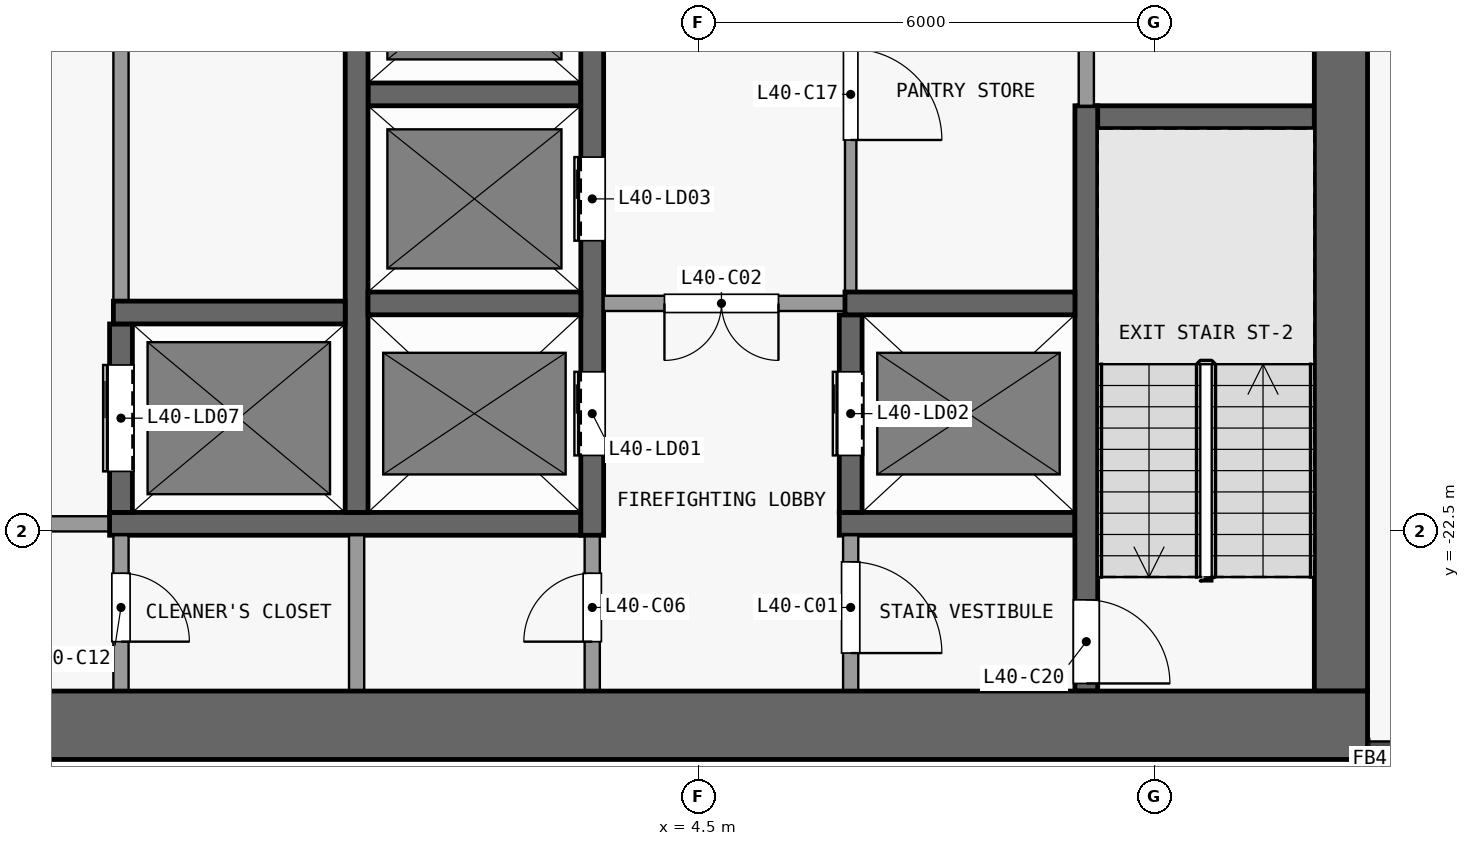
"""IFC4 building model, lengths in metres.
Left out: names, types, materials, properties, quantities, classifications, styles, units other than length and angle.
Written with IfcOpenShell. Run it as: python <this file> out.ifc"""

import sys

from ifc_helpers import new_model, si_unit, direction, frame, frame_2d, origin, place, context, subcontext, project, spatial, rectangle, extrude, element, fill, save


model = new_model("IFC4")
c1 = context("Model", 3, precision=1e-05, world=origin(), true_north=direction((0.0, 1.0)))
c2 = subcontext(c1, "Body", "Model", "MODEL_VIEW")
j1 = project(units=[si_unit("LENGTHUNIT", "METRE"), si_unit("PLANEANGLEUNIT", "RADIAN")], contexts=[c1])
p1 = place(None, origin())
s1 = spatial("IfcSite", under=j1, at=p1, CompositionType="ELEMENT")
p2 = place(p1, origin())
s2 = spatial("IfcBuilding", under=s1, at=p2, CompositionType="ELEMENT")
p3 = place(p2, frame((0.0, 0.0, 163.7)))
s3 = spatial("IfcBuildingStorey", under=s2, at=p3, CompositionType="ELEMENT", Elevation=163.7)
p4 = place(p3, frame((-13.3, -25.05, 0.0), z_axis=(0.0, 0.0, 1.0), x_axis=(1.0, 0.0, 0.0)))
e1 = element("IfcWall", 1, at=p4, inside=s3, PredefinedType="SHEAR", context=c2, shape_type="SweptSolid", body=[
    extrude(rectangle(XDim=26.6, YDim=0.9, at=frame_2d((13.3, 0.0))), origin(), (0.0, 0.0, 1.0), 3.3),
])
p5 = place(p3, frame((12.95, -24.6, 0.0), z_axis=(0.0, 0.0, 1.0), x_axis=(0.0, 1.0, 0.0)))
e2 = element("IfcWall", 2, at=p5, inside=s3, PredefinedType="SHEAR", context=c2, shape_type="SweptSolid", body=[
    extrude(rectangle(XDim=16.1, YDim=0.7, at=frame_2d((8.05, 0.0))), origin(), (0.0, 0.0, 1.0), 3.3),
])
p6 = place(p3, frame((-3.25, -22.4, 0.0), z_axis=(0.0, 0.0, 1.0), x_axis=(-1.0, 0.0, 0.0)))
e3 = element("IfcWall", 3, at=p6, inside=s3, PredefinedType="PARTITIONING", context=c2, shape_type="SweptSolid", body=[
    extrude(rectangle(XDim=6.2, YDim=0.2, at=frame_2d((3.1, 0.0))), origin(), (0.0, 0.0, 1.0), 3.3),
])
p7 = place(p6, frame((0.8, 0.0, 0.0)))
e4 = element("IfcOpeningElement", 4, at=p7, cuts=e3, PredefinedType="OPENING", context=c2, shape_type="SweptSolid", body=[
    extrude(rectangle(XDim=1.5, YDim=2.1, at=frame_2d((0.75, 1.05))), frame((0.0, 0.11, 0.0), z_axis=(0.0, -1.0, 0.0), x_axis=(1.0, 0.0, 0.0)), (0.0, 0.0, 1.0), 0.22),
])
p8 = place(p3, frame((-3.25, -22.4, 0.0), z_axis=(0.0, 0.0, 1.0), x_axis=(1.0, 0.0, 0.0)))
e5 = element("IfcWall", 5, at=p8, inside=s3, PredefinedType="SHEAR", context=c2, shape_type="SweptSolid", body=[
    extrude(rectangle(XDim=6.2, YDim=0.3, at=frame_2d((3.1, 0.0))), origin(), (0.0, 0.0, 1.0), 3.3),
])
p9 = place(p3, frame((6.35, -22.4, 0.0), z_axis=(0.0, 0.0, 1.0), x_axis=(1.0, 0.0, 0.0)))
e6 = element("IfcWall", 6, at=p9, inside=s3, PredefinedType="SHEAR", context=c2, shape_type="SweptSolid", body=[
    extrude(rectangle(XDim=3.1, YDim=0.3, at=frame_2d((1.55, 0.0))), origin(), (0.0, 0.0, 1.0), 3.3),
])
p10 = place(p3, frame((-3.2, -19.62, 0.0), z_axis=(0.0, 0.0, 1.0), x_axis=(1.0, 0.0, 0.0)))
e7 = element("IfcWall", 7, at=p10, inside=s3, PredefinedType="SHEAR", context=c2, shape_type="SweptSolid", body=[
    extrude(rectangle(XDim=3.05, YDim=0.3, at=frame_2d((1.525, 0.0))), origin(), (0.0, 0.0, 1.0), 3.3),
])
p11 = place(p3, frame((0.15, -19.5, 0.0), z_axis=(0.0, 0.0, 1.0), x_axis=(1.0, 0.0, 0.0)))
e8 = element("IfcWall", 8, at=p11, inside=s3, PredefinedType="SHEAR", context=c2, shape_type="SweptSolid", body=[
    extrude(rectangle(XDim=2.8, YDim=0.3, at=frame_2d((1.4, 0.0))), origin(), (0.0, 0.0, 1.0), 3.3),
])
p12 = place(p3, frame((6.575, -19.5, 0.0), z_axis=(0.0, 0.0, 1.0), x_axis=(-1.0, 0.0, 0.0)))
e9 = element("IfcWall", 9, at=p12, inside=s3, PredefinedType="PARTITIONING", context=c2, shape_type="SweptSolid", body=[
    extrude(rectangle(XDim=3.325, YDim=0.2, at=frame_2d((1.663, 0.0))), origin(), (0.0, 0.0, 1.0), 3.3),
])
p13 = place(p12, frame((1.025, 0.0, 0.0)))
e10 = element("IfcOpeningElement", 10, at=p13, cuts=e9, PredefinedType="OPENING", context=c2, shape_type="SweptSolid", body=[
    extrude(rectangle(XDim=1.5, YDim=2.1, at=frame_2d((0.75, 1.05))), frame((0.0, 0.11, 0.0), z_axis=(0.0, -1.0, 0.0), x_axis=(1.0, 0.0, 0.0)), (0.0, 0.0, 1.0), 0.22),
])
p14 = place(p3, frame((6.425, -19.5, 0.0), z_axis=(0.0, 0.0, 1.0), x_axis=(1.0, 0.0, 0.0)))
e11 = element("IfcWall", 11, at=p14, inside=s3, PredefinedType="SHEAR", context=c2, shape_type="SweptSolid", body=[
    extrude(rectangle(XDim=3.025, YDim=0.3, at=frame_2d((1.512, 0.0))), origin(), (0.0, 0.0, 1.0), 3.3),
])
p15 = place(p3, frame((9.5, -17.05, 0.0), z_axis=(0.0, 0.0, 1.0), x_axis=(1.0, 0.0, 0.0)))
e12 = element("IfcWall", 12, at=p15, inside=s3, PredefinedType="SHEAR", context=c2, shape_type="SweptSolid", body=[
    extrude(rectangle(XDim=3.1, YDim=0.3, at=frame_2d((1.55, 0.0))), origin(), (0.0, 0.0, 1.0), 3.3),
])
p16 = place(p3, frame((0.15, -16.75, 0.0), z_axis=(0.0, 0.0, 1.0), x_axis=(1.0, 0.0, 0.0)))
e13 = element("IfcWall", 13, at=p16, inside=s3, PredefinedType="SHEAR", context=c2, shape_type="SweptSolid", body=[
    extrude(rectangle(XDim=2.8, YDim=0.3, at=frame_2d((1.4, 0.0))), origin(), (0.0, 0.0, 1.0), 3.3),
])
p17 = place(p3, frame((-3.1, -22.55, 0.0), z_axis=(0.0, 0.0, 1.0), x_axis=(0.0, -1.0, 0.0)))
e14 = element("IfcWall", 14, at=p17, inside=s3, PredefinedType="PARTITIONING", context=c2, shape_type="SweptSolid", body=[
    extrude(rectangle(XDim=2.05, YDim=0.2, at=frame_2d((1.025, 0.0))), origin(), (0.0, 0.0, 1.0), 3.3),
])
p18 = place(p17, frame((0.5, 0.0, 0.0)))
e15 = element("IfcOpeningElement", 15, at=p18, cuts=e14, PredefinedType="OPENING", context=c2, shape_type="SweptSolid", body=[
    extrude(rectangle(XDim=0.9, YDim=2.1, at=frame_2d((0.45, 1.05))), frame((0.0, 0.11, 0.0), z_axis=(0.0, -1.0, 0.0), x_axis=(1.0, 0.0, 0.0)), (0.0, 0.0, 1.0), 0.22),
])
p19 = place(p3, frame((-3.1, -22.25, 0.0), z_axis=(0.0, 0.0, 1.0), x_axis=(0.0, 1.0, 0.0)))
e16 = element("IfcWall", 16, at=p19, inside=s3, PredefinedType="SHEAR", context=c2, shape_type="SweptSolid", body=[
    extrude(rectangle(XDim=2.48, YDim=0.3, at=frame_2d((1.24, 0.0))), origin(), (0.0, 0.0, 1.0), 3.3),
])
p20 = place(p19, frame((0.54, 0.0, 0.0)))
e17 = element("IfcOpeningElement", 17, at=p20, cuts=e16, PredefinedType="OPENING", context=c2, shape_type="SweptSolid", body=[
    extrude(rectangle(XDim=1.4, YDim=2.1, at=frame_2d((0.7, 1.05))), frame((0.0, 0.16, 0.0), z_axis=(0.0, -1.0, 0.0), x_axis=(1.0, 0.0, 0.0)), (0.0, 0.0, 1.0), 0.32),
])
p21 = place(p3, frame((-3.1, -8.5, 0.0), z_axis=(0.0, 0.0, 1.0), x_axis=(0.0, -1.0, 0.0)))
e18 = element("IfcWall", 18, at=p21, inside=s3, PredefinedType="PARTITIONING", context=c2, shape_type="SweptSolid", body=[
    extrude(rectangle(XDim=10.97, YDim=0.2, at=frame_2d((5.485, 0.0))), origin(), (0.0, 0.0, 1.0), 3.3),
])
p22 = place(p21, frame((6.35, 0.0, 0.0)))
e19 = element("IfcOpeningElement", 19, at=p22, cuts=e18, PredefinedType="OPENING", context=c2, shape_type="SweptSolid", body=[
    extrude(rectangle(XDim=1.2, YDim=2.1, at=frame_2d((0.6, 1.05))), frame((0.0, 0.11, 0.0), z_axis=(0.0, -1.0, 0.0), x_axis=(1.0, 0.0, 0.0)), (0.0, 0.0, 1.0), 0.22),
])
p23 = place(p21, frame((0.94, 0.0, 0.0)))
e20 = element("IfcOpeningElement", 20, at=p23, cuts=e18, PredefinedType="OPENING", context=c2, shape_type="SweptSolid", body=[
    extrude(rectangle(XDim=0.9, YDim=2.1, at=frame_2d((0.45, 1.05))), frame((0.0, 0.11, 0.0), z_axis=(0.0, -1.0, 0.0), x_axis=(1.0, 0.0, 0.0)), (0.0, 0.0, 1.0), 0.22),
])
p24 = place(p3, frame((0.0, -24.6, 0.0), z_axis=(0.0, 0.0, 1.0), x_axis=(0.0, 1.0, 0.0)))
e21 = element("IfcWall", 21, at=p24, inside=s3, PredefinedType="PARTITIONING", context=c2, shape_type="SweptSolid", body=[
    extrude(rectangle(XDim=2.05, YDim=0.2, at=frame_2d((1.025, 0.0))), origin(), (0.0, 0.0, 1.0), 3.3),
])
p25 = place(p3, frame((0.0, -22.25, 0.0), z_axis=(0.0, 0.0, 1.0), x_axis=(0.0, 1.0, 0.0)))
e22 = element("IfcWall", 22, at=p25, inside=s3, PredefinedType="SHEAR", context=c2, shape_type="SweptSolid", body=[
    extrude(rectangle(XDim=13.75, YDim=0.3, at=frame_2d((6.875, 0.0))), origin(), (0.0, 0.0, 1.0), 3.3),
])
p26 = place(p3, frame((3.1, -24.6, 0.0), z_axis=(0.0, 0.0, 1.0), x_axis=(0.0, 1.0, 0.0)))
e23 = element("IfcWall", 23, at=p26, inside=s3, PredefinedType="PARTITIONING", context=c2, shape_type="SweptSolid", body=[
    extrude(rectangle(XDim=2.05, YDim=0.2, at=frame_2d((1.025, 0.0))), origin(), (0.0, 0.0, 1.0), 3.3),
])
p27 = place(p26, frame((0.65, 0.0, 0.0)))
e24 = element("IfcOpeningElement", 24, at=p27, cuts=e23, PredefinedType="OPENING", context=c2, shape_type="SweptSolid", body=[
    extrude(rectangle(XDim=0.9, YDim=2.1, at=frame_2d((0.45, 1.05))), frame((0.0, 0.11, 0.0), z_axis=(0.0, -1.0, 0.0), x_axis=(1.0, 0.0, 0.0)), (0.0, 0.0, 1.0), 0.22),
])
p28 = place(p3, frame((3.1, -22.55, 0.0), z_axis=(0.0, 0.0, 1.0), x_axis=(0.0, 1.0, 0.0)))
e25 = element("IfcWall", 25, at=p28, inside=s3, PredefinedType="SHEAR", context=c2, shape_type="SweptSolid", body=[
    extrude(rectangle(XDim=14.05, YDim=0.3, at=frame_2d((7.025, 0.0))), origin(), (0.0, 0.0, 1.0), 3.3),
])
p29 = place(p28, frame((1.05, 0.0, 0.0)))
e26 = element("IfcOpeningElement", 26, at=p29, cuts=e25, PredefinedType="OPENING", context=c2, shape_type="SweptSolid", body=[
    extrude(rectangle(XDim=1.1, YDim=2.1, at=frame_2d((0.55, 1.05))), frame((0.0, 0.16, 0.0), z_axis=(0.0, -1.0, 0.0), x_axis=(1.0, 0.0, 0.0)), (0.0, 0.0, 1.0), 0.32),
])
p30 = place(p28, frame((3.875, 0.0, 0.0)))
e27 = element("IfcOpeningElement", 27, at=p30, cuts=e25, PredefinedType="OPENING", context=c2, shape_type="SweptSolid", body=[
    extrude(rectangle(XDim=1.1, YDim=2.1, at=frame_2d((0.55, 1.05))), frame((0.0, 0.16, 0.0), z_axis=(0.0, -1.0, 0.0), x_axis=(1.0, 0.0, 0.0)), (0.0, 0.0, 1.0), 0.32),
])
p31 = place(p28, frame((6.625, 0.0, 0.0)))
e28 = element("IfcOpeningElement", 28, at=p31, cuts=e25, PredefinedType="OPENING", context=c2, shape_type="SweptSolid", body=[
    extrude(rectangle(XDim=1.1, YDim=2.1, at=frame_2d((0.55, 1.05))), frame((0.0, 0.16, 0.0), z_axis=(0.0, -1.0, 0.0), x_axis=(1.0, 0.0, 0.0)), (0.0, 0.0, 1.0), 0.32),
])
p32 = place(p28, frame((9.375, 0.0, 0.0)))
e29 = element("IfcOpeningElement", 29, at=p32, cuts=e25, PredefinedType="OPENING", context=c2, shape_type="SweptSolid", body=[
    extrude(rectangle(XDim=1.1, YDim=2.1, at=frame_2d((0.55, 1.05))), frame((0.0, 0.16, 0.0), z_axis=(0.0, -1.0, 0.0), x_axis=(1.0, 0.0, 0.0)), (0.0, 0.0, 1.0), 0.32),
])
p33 = place(p28, frame((12.125, 0.0, 0.0)))
e30 = element("IfcOpeningElement", 30, at=p33, cuts=e25, PredefinedType="OPENING", context=c2, shape_type="SweptSolid", body=[
    extrude(rectangle(XDim=1.1, YDim=2.1, at=frame_2d((0.55, 1.05))), frame((0.0, 0.16, 0.0), z_axis=(0.0, -1.0, 0.0), x_axis=(1.0, 0.0, 0.0)), (0.0, 0.0, 1.0), 0.32),
])
p34 = place(p3, frame((6.5, -22.55, 0.0), z_axis=(0.0, 0.0, 1.0), x_axis=(0.0, -1.0, 0.0)))
e31 = element("IfcWall", 31, at=p34, inside=s3, PredefinedType="PARTITIONING", context=c2, shape_type="SweptSolid", body=[
    extrude(rectangle(XDim=2.05, YDim=0.2, at=frame_2d((1.025, 0.0))), origin(), (0.0, 0.0, 1.0), 3.3),
])
p35 = place(p34, frame((0.35, 0.0, 0.0)))
e32 = element("IfcOpeningElement", 32, at=p35, cuts=e31, PredefinedType="OPENING", context=c2, shape_type="SweptSolid", body=[
    extrude(rectangle(XDim=1.2, YDim=2.1, at=frame_2d((0.6, 1.05))), frame((0.0, 0.11, 0.0), z_axis=(0.0, -1.0, 0.0), x_axis=(1.0, 0.0, 0.0)), (0.0, 0.0, 1.0), 0.22),
])
p36 = place(p3, frame((6.5, -22.25, 0.0), z_axis=(0.0, 0.0, 1.0), x_axis=(0.0, 1.0, 0.0)))
e33 = element("IfcWall", 33, at=p36, inside=s3, PredefinedType="SHEAR", context=c2, shape_type="SweptSolid", body=[
    extrude(rectangle(XDim=2.6, YDim=0.3, at=frame_2d((1.3, 0.0))), origin(), (0.0, 0.0, 1.0), 3.3),
])
p37 = place(p36, frame((0.75, 0.0, 0.0)))
e34 = element("IfcOpeningElement", 34, at=p37, cuts=e33, PredefinedType="OPENING", context=c2, shape_type="SweptSolid", body=[
    extrude(rectangle(XDim=1.1, YDim=2.1, at=frame_2d((0.55, 1.05))), frame((0.0, 0.16, 0.0), z_axis=(0.0, -1.0, 0.0), x_axis=(1.0, 0.0, 0.0)), (0.0, 0.0, 1.0), 0.32),
])
p38 = place(p3, frame((6.5, -8.5, 0.0), z_axis=(0.0, 0.0, 1.0), x_axis=(0.0, -1.0, 0.0)))
e35 = element("IfcWall", 35, at=p38, inside=s3, PredefinedType="PARTITIONING", context=c2, shape_type="SweptSolid", body=[
    extrude(rectangle(XDim=10.85, YDim=0.15, at=frame_2d((5.425, 0.0))), origin(), (0.0, 0.0, 1.0), 3.3),
])
p39 = place(p38, frame((7.65, 0.0, 0.0)))
e36 = element("IfcOpeningElement", 36, at=p39, cuts=e35, PredefinedType="OPENING", context=c2, shape_type="SweptSolid", body=[
    extrude(rectangle(XDim=1.2, YDim=2.1, at=frame_2d((0.6, 1.05))), frame((0.0, 0.085, 0.0), z_axis=(0.0, -1.0, 0.0), x_axis=(1.0, 0.0, 0.0)), (0.0, 0.0, 1.0), 0.17),
])
p40 = place(p38, frame((2.15, 0.0, 0.0)))
e37 = element("IfcOpeningElement", 37, at=p40, cuts=e35, PredefinedType="OPENING", context=c2, shape_type="SweptSolid", body=[
    extrude(rectangle(XDim=1.2, YDim=2.1, at=frame_2d((0.6, 1.05))), frame((0.0, 0.085, 0.0), z_axis=(0.0, -1.0, 0.0), x_axis=(1.0, 0.0, 0.0)), (0.0, 0.0, 1.0), 0.17),
])
p41 = place(p3, frame((9.6, -16.9, 0.0), z_axis=(0.0, 0.0, 1.0), x_axis=(0.0, -1.0, 0.0)))
e38 = element("IfcWall", 38, at=p41, inside=s3, PredefinedType="SHEAR", context=c2, shape_type="SweptSolid", body=[
    extrude(rectangle(XDim=7.7, YDim=0.3, at=frame_2d((3.85, 0.0))), origin(), (0.0, 0.0, 1.0), 3.3),
])
p42 = place(p41, frame((6.5, 0.0, 0.0)))
e39 = element("IfcOpeningElement", 39, at=p42, cuts=e38, PredefinedType="OPENING", context=c2, shape_type="SweptSolid", body=[
    extrude(rectangle(XDim=1.1, YDim=2.1, at=frame_2d((0.55, 1.05))), frame((0.0, 0.16, 0.0), z_axis=(0.0, -1.0, 0.0), x_axis=(1.0, 0.0, 0.0)), (0.0, 0.0, 1.0), 0.32),
])
p43 = place(p3, frame((9.6, -16.9, 0.0), z_axis=(0.0, 0.0, 1.0), x_axis=(0.0, 1.0, 0.0)))
e40 = element("IfcWall", 40, at=p43, inside=s3, PredefinedType="PARTITIONING", context=c2, shape_type="SweptSolid", body=[
    extrude(rectangle(XDim=8.4, YDim=0.2, at=frame_2d((4.2, 0.0))), origin(), (0.0, 0.0, 1.0), 3.3),
])
p44 = place(p29, origin())
e41 = element("IfcDoor", 41, at=p44, inside=s3, OperationType="DOUBLE_DOOR_SLIDING", PredefinedType="DOOR", context=c2, shape_type="SweptSolid", body=[
    extrude(rectangle(XDim=1.1, YDim=2.1, at=frame_2d((0.55, 1.05))), frame((0.0, 0.025, 0.0), z_axis=(0.0, -1.0, 0.0), x_axis=(1.0, 0.0, 0.0)), (0.0, 0.0, 1.0), 0.05),
])
fill(e26, e41)
p45 = place(p37, origin())
e42 = element("IfcDoor", 42, at=p45, inside=s3, OperationType="DOUBLE_DOOR_SLIDING", PredefinedType="DOOR", context=c2, shape_type="SweptSolid", body=[
    extrude(rectangle(XDim=1.1, YDim=2.1, at=frame_2d((0.55, 1.05))), frame((0.0, 0.025, 0.0), z_axis=(0.0, -1.0, 0.0), x_axis=(1.0, 0.0, 0.0)), (0.0, 0.0, 1.0), 0.05),
])
fill(e34, e42)
p46 = place(p30, origin())
e43 = element("IfcDoor", 43, at=p46, inside=s3, OperationType="DOUBLE_DOOR_SLIDING", PredefinedType="DOOR", context=c2, shape_type="SweptSolid", body=[
    extrude(rectangle(XDim=1.1, YDim=2.1, at=frame_2d((0.55, 1.05))), frame((0.0, 0.025, 0.0), z_axis=(0.0, -1.0, 0.0), x_axis=(1.0, 0.0, 0.0)), (0.0, 0.0, 1.0), 0.05),
])
fill(e27, e43)
p47 = place(p20, origin())
e44 = element("IfcDoor", 44, at=p47, inside=s3, OperationType="DOUBLE_DOOR_SLIDING", PredefinedType="DOOR", context=c2, shape_type="SweptSolid", body=[
    extrude(rectangle(XDim=1.4, YDim=2.1, at=frame_2d((0.7, 1.05))), frame((0.0, 0.025, 0.0), z_axis=(0.0, -1.0, 0.0), x_axis=(1.0, 0.0, 0.0)), (0.0, 0.0, 1.0), 0.05),
])
fill(e17, e44)
p48 = place(p35, origin())
e45 = element("IfcDoor", 45, at=p48, inside=s3, OperationType="SINGLE_SWING_RIGHT", PredefinedType="DOOR", context=c2, shape_type="SweptSolid", body=[
    extrude(rectangle(XDim=1.2, YDim=2.1, at=frame_2d((0.6, 1.05))), frame((0.0, 0.025, 0.0), z_axis=(0.0, -1.0, 0.0), x_axis=(1.0, 0.0, 0.0)), (0.0, 0.0, 1.0), 0.05),
])
fill(e32, e45)
p49 = place(p13, origin())
e46 = element("IfcDoor", 46, at=p49, inside=s3, OperationType="DOUBLE_DOOR_SINGLE_SWING", PredefinedType="DOOR", context=c2, shape_type="SweptSolid", body=[
    extrude(rectangle(XDim=1.5, YDim=2.1, at=frame_2d((0.75, 1.05))), frame((0.0, 0.025, 0.0), z_axis=(0.0, -1.0, 0.0), x_axis=(1.0, 0.0, 0.0)), (0.0, 0.0, 1.0), 0.05),
])
fill(e10, e46)
p50 = place(p27, origin())
e47 = element("IfcDoor", 47, at=p50, inside=s3, OperationType="SINGLE_SWING_LEFT", PredefinedType="DOOR", context=c2, shape_type="SweptSolid", body=[
    extrude(rectangle(XDim=0.9, YDim=2.1, at=frame_2d((0.45, 1.05))), frame((0.0, 0.025, 0.0), z_axis=(0.0, -1.0, 0.0), x_axis=(1.0, 0.0, 0.0)), (0.0, 0.0, 1.0), 0.05),
])
fill(e24, e47)
p51 = place(p18, origin())
e48 = element("IfcDoor", 48, at=p51, inside=s3, OperationType="SINGLE_SWING_RIGHT", PredefinedType="DOOR", context=c2, shape_type="SweptSolid", body=[
    extrude(rectangle(XDim=0.9, YDim=2.1, at=frame_2d((0.45, 1.05))), frame((0.0, 0.025, 0.0), z_axis=(0.0, -1.0, 0.0), x_axis=(1.0, 0.0, 0.0)), (0.0, 0.0, 1.0), 0.05),
])
fill(e15, e48)
p52 = place(p39, origin())
e49 = element("IfcDoor", 49, at=p52, inside=s3, OperationType="SINGLE_SWING_RIGHT", PredefinedType="DOOR", context=c2, shape_type="SweptSolid", body=[
    extrude(rectangle(XDim=1.2, YDim=2.1, at=frame_2d((0.6, 1.05))), frame((0.0, 0.025, 0.0), z_axis=(0.0, -1.0, 0.0), x_axis=(1.0, 0.0, 0.0)), (0.0, 0.0, 1.0), 0.05),
])
fill(e36, e49)
p53 = place(p42, origin())
e50 = element("IfcDoor", 50, at=p53, inside=s3, OperationType="SINGLE_SWING_RIGHT", PredefinedType="DOOR", context=c2, shape_type="SweptSolid", body=[
    extrude(rectangle(XDim=1.1, YDim=2.1, at=frame_2d((0.55, 1.05))), frame((0.0, 0.025, 0.0), z_axis=(0.0, -1.0, 0.0), x_axis=(1.0, 0.0, 0.0)), (0.0, 0.0, 1.0), 0.05),
])
fill(e39, e50)
save(model, sys.argv[1])
